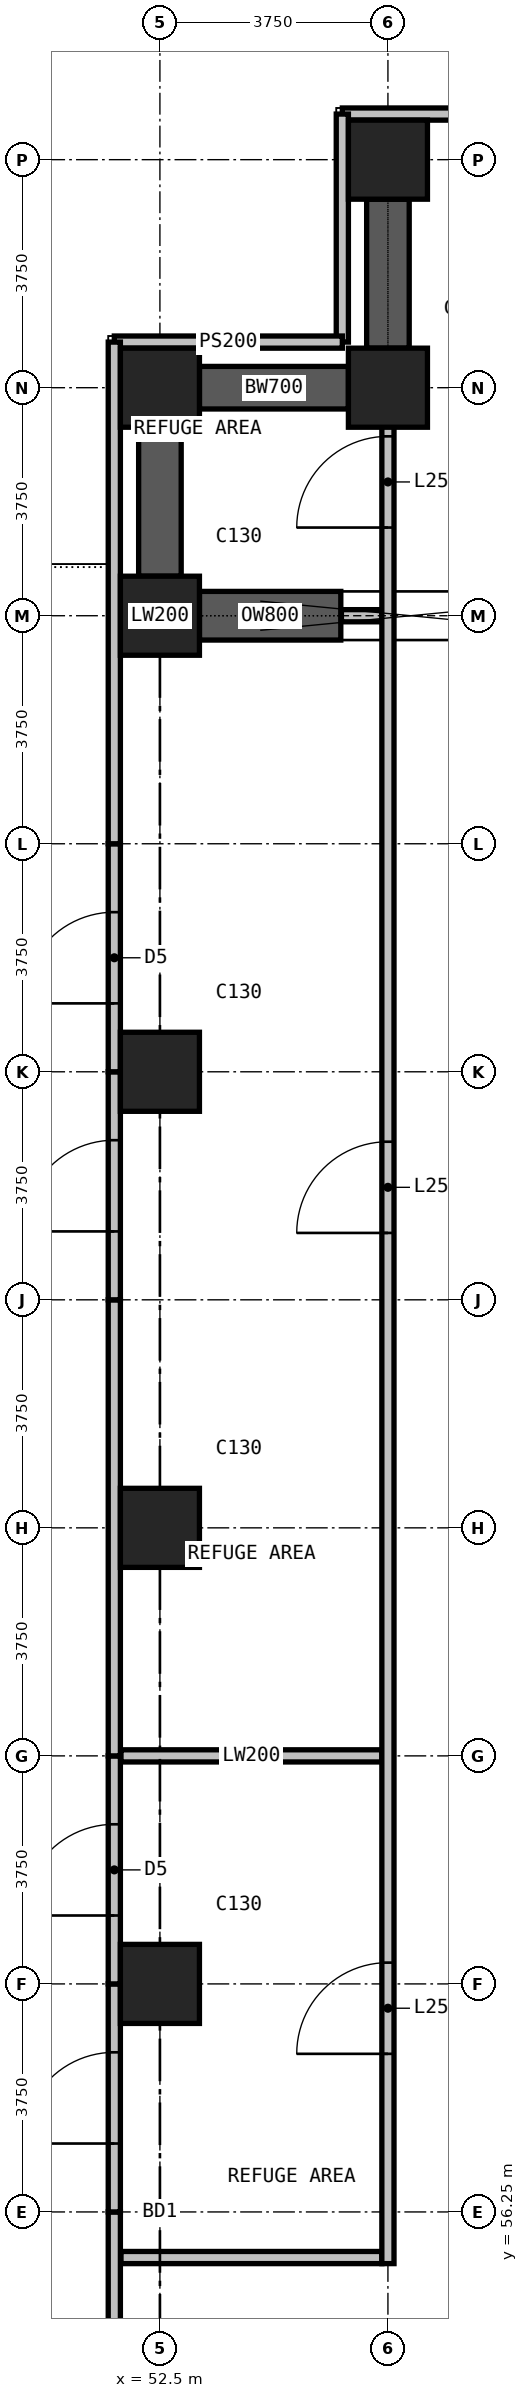
"""IFC4 building model, lengths in metres.
Left out: names, types, materials, properties, quantities, classifications, styles, units other than length and angle.
Written with IfcOpenShell. Run it as: python <this file> out.ifc"""

import sys

from ifc_helpers import new_model, si_unit, direction, frame, frame_2d, origin, origin_2d, place, context, subcontext, project, spatial, rectangle, extrude, element, fill, save


model = new_model("IFC4")
c1 = context("Model", 3, precision=1e-05, world=origin(), true_north=direction((0.0, 1.0)))
c2 = subcontext(c1, "Body", "Model", "MODEL_VIEW")
j1 = project(units=[si_unit("LENGTHUNIT", "METRE"), si_unit("PLANEANGLEUNIT", "RADIAN")], contexts=[c1])
p1 = place(None, origin())
s1 = spatial("IfcSite", under=j1, at=p1, CompositionType="ELEMENT")
p2 = place(p1, origin())
s2 = spatial("IfcBuilding", under=s1, at=p2, CompositionType="ELEMENT")
p3 = place(p2, frame((0.0, 0.0, 102.2)))
s3 = spatial("IfcBuildingStorey", under=s2, at=p3, CompositionType="ELEMENT", Elevation=102.2)
for number, where, z_axis, x_axis in (
    (1, (52.5, 60.0, 0.0), (0.0, 0.0, 1.0), (1.0, 0.0, 0.0)),
    (2, (52.5, 67.5, 0.0), (0.0, 0.0, 1.0), (1.0, 0.0, 0.0)),
    (3, (52.5, 75.0, 0.0), (0.0, 0.0, 1.0), (1.0, 0.0, 0.0)),
    (4, (52.5, 82.5, 0.0), (0.0, 0.0, 1.0), (1.0, 0.0, 0.0)),
    (5, (52.5, 86.25, 0.0), (0.0, 0.0, 1.0), (1.0, 0.0, 0.0)),
    (6, (56.25, 86.25, 0.0), (0.0, 0.0, 1.0), (1.0, 0.0, 0.0)),
    (7, (56.25, 90.0, 0.0), (0.0, 0.0, 1.0), (1.0, 0.0, 0.0)),
):
    element("IfcColumn", number, at=place(p3, frame(where, z_axis=z_axis, x_axis=x_axis)), inside=s3, PredefinedType="COLUMN", context=c2, shape_type="SweptSolid", body=[
        extrude(rectangle(XDim=1.3, YDim=1.3, at=origin_2d()), origin(), (0.0, 0.0, 1.0), 5.0),
    ])
for number, where, z_axis, x_axis in (
    (8, (52.5, 83.15, 0.0), (0.0, 0.0, 1.0), (0.0, 1.0, 0.0)),
    (9, (53.15, 86.25, 0.0), (0.0, 0.0, 1.0), (1.0, 0.0, 0.0)),
    (10, (56.25, 86.9, 0.0), (0.0, 0.0, 1.0), (0.0, 1.0, 0.0)),
):
    element("IfcWall", number, at=place(p3, frame(where, z_axis=z_axis, x_axis=x_axis)), inside=s3, PredefinedType="SHEAR", context=c2, shape_type="SweptSolid", body=[
        extrude(rectangle(XDim=2.45, YDim=0.7, at=frame_2d((1.225, 0.0))), origin(), (0.0, 0.0, 1.0), 4.7),
    ])
p4 = place(p3, frame((53.15, 82.5, 0.0), z_axis=(0.0, 0.0, 1.0), x_axis=(1.0, 0.0, 0.0)))
e11 = element("IfcWall", 11, at=p4, inside=s3, PredefinedType="SHEAR", context=c2, shape_type="SweptSolid", body=[
    extrude(rectangle(XDim=2.325, YDim=0.8, at=frame_2d((1.163, 0.0))), origin(), (0.0, 0.0, 1.0), 4.7),
])
for number, where, z_axis, x_axis in (
    (12, (55.5, 90.75, 0.0), (0.0, 0.0, 1.0), (1.0, 0.0, 0.0)),
    (13, (55.5, 87.0, 0.0), (0.0, 0.0, 1.0), (0.0, 1.0, 0.0)),
    (14, (51.75, 87.0, 0.0), (0.0, 0.0, 1.0), (1.0, 0.0, 0.0)),
):
    element("IfcWall", number, at=place(p3, frame(where, z_axis=z_axis, x_axis=x_axis)), inside=s3, PredefinedType="SOLIDWALL", context=c2, shape_type="SweptSolid", body=[
        extrude(rectangle(XDim=3.75, YDim=0.2, at=frame_2d((1.875, 0.0))), origin(), (0.0, 0.0, 1.0), 4.7),
    ])
p5 = place(p3, frame((51.75, 51.75, 0.0), z_axis=(0.0, 0.0, 1.0), x_axis=(0.0, 1.0, 0.0)))
e15 = element("IfcWall", 15, at=p5, inside=s3, PredefinedType="SOLIDWALL", context=c2, shape_type="SweptSolid", body=[
    extrude(rectangle(XDim=4.5, YDim=0.2, at=frame_2d((2.25, 0.0))), origin(), (0.0, 0.0, 1.0), 4.7),
])
p6 = place(p3, frame((51.75, 56.25, 0.0), z_axis=(0.0, 0.0, 1.0), x_axis=(0.0, 1.0, 0.0)))
e16 = element("IfcWall", 16, at=p6, inside=s3, PredefinedType="SOLIDWALL", context=c2, shape_type="SweptSolid", body=[
    extrude(rectangle(XDim=3.75, YDim=0.2, at=frame_2d((1.875, 0.0))), origin(), (0.0, 0.0, 1.0), 4.7),
])
p7 = place(p6, frame((1.125, 0.0, 0.0)))
e17 = element("IfcOpeningElement", 17, at=p7, cuts=e16, PredefinedType="OPENING", context=c2, shape_type="SweptSolid", body=[
    extrude(rectangle(XDim=1.5, YDim=2.4, at=frame_2d((0.75, 1.2))), frame((0.0, 0.11, 0.0), z_axis=(0.0, -1.0, 0.0), x_axis=(1.0, 0.0, 0.0)), (0.0, 0.0, 1.0), 0.22),
])
p8 = place(p3, frame((51.75, 60.0, 0.0), z_axis=(0.0, 0.0, 1.0), x_axis=(0.0, 1.0, 0.0)))
e18 = element("IfcWall", 18, at=p8, inside=s3, PredefinedType="SOLIDWALL", context=c2, shape_type="SweptSolid", body=[
    extrude(rectangle(XDim=3.75, YDim=0.2, at=frame_2d((1.875, 0.0))), origin(), (0.0, 0.0, 1.0), 4.7),
])
p9 = place(p8, frame((1.125, 0.0, 0.0)))
e19 = element("IfcOpeningElement", 19, at=p9, cuts=e18, PredefinedType="OPENING", context=c2, shape_type="SweptSolid", body=[
    extrude(rectangle(XDim=1.5, YDim=2.4, at=frame_2d((0.75, 1.2))), frame((0.0, 0.11, 0.0), z_axis=(0.0, -1.0, 0.0), x_axis=(1.0, 0.0, 0.0)), (0.0, 0.0, 1.0), 0.22),
])
p10 = place(p3, frame((51.75, 63.75, 0.0), z_axis=(0.0, 0.0, 1.0), x_axis=(0.0, 1.0, 0.0)))
e20 = element("IfcWall", 20, at=p10, inside=s3, PredefinedType="SOLIDWALL", context=c2, shape_type="SweptSolid", body=[
    extrude(rectangle(XDim=7.5, YDim=0.2, at=frame_2d((3.75, 0.0))), origin(), (0.0, 0.0, 1.0), 4.7),
])
p11 = place(p3, frame((51.75, 71.25, 0.0), z_axis=(0.0, 0.0, 1.0), x_axis=(0.0, 1.0, 0.0)))
e21 = element("IfcWall", 21, at=p11, inside=s3, PredefinedType="SOLIDWALL", context=c2, shape_type="SweptSolid", body=[
    extrude(rectangle(XDim=3.75, YDim=0.2, at=frame_2d((1.875, 0.0))), origin(), (0.0, 0.0, 1.0), 4.7),
])
p12 = place(p11, frame((1.125, 0.0, 0.0)))
e22 = element("IfcOpeningElement", 22, at=p12, cuts=e21, PredefinedType="OPENING", context=c2, shape_type="SweptSolid", body=[
    extrude(rectangle(XDim=1.5, YDim=2.4, at=frame_2d((0.75, 1.2))), frame((0.0, 0.11, 0.0), z_axis=(0.0, -1.0, 0.0), x_axis=(1.0, 0.0, 0.0)), (0.0, 0.0, 1.0), 0.22),
])
p13 = place(p3, frame((51.75, 75.0, 0.0), z_axis=(0.0, 0.0, 1.0), x_axis=(0.0, 1.0, 0.0)))
e23 = element("IfcWall", 23, at=p13, inside=s3, PredefinedType="SOLIDWALL", context=c2, shape_type="SweptSolid", body=[
    extrude(rectangle(XDim=3.75, YDim=0.2, at=frame_2d((1.875, 0.0))), origin(), (0.0, 0.0, 1.0), 4.7),
])
p14 = place(p13, frame((1.125, 0.0, 0.0)))
e24 = element("IfcOpeningElement", 24, at=p14, cuts=e23, PredefinedType="OPENING", context=c2, shape_type="SweptSolid", body=[
    extrude(rectangle(XDim=1.5, YDim=2.4, at=frame_2d((0.75, 1.2))), frame((0.0, 0.11, 0.0), z_axis=(0.0, -1.0, 0.0), x_axis=(1.0, 0.0, 0.0)), (0.0, 0.0, 1.0), 0.22),
])
p15 = place(p3, frame((51.75, 78.75, 0.0), z_axis=(0.0, 0.0, 1.0), x_axis=(0.0, 1.0, 0.0)))
e25 = element("IfcWall", 25, at=p15, inside=s3, PredefinedType="SOLIDWALL", context=c2, shape_type="SweptSolid", body=[
    extrude(rectangle(XDim=8.25, YDim=0.2, at=frame_2d((4.125, 0.0))), origin(), (0.0, 0.0, 1.0), 4.7),
])
for number, where, z_axis, x_axis in (
    (26, (51.86, 55.5, 0.0), (0.0, 0.0, 1.0), (1.0, 0.0, 0.0)),
    (27, (51.86, 63.75, 0.0), (0.0, 0.0, 1.0), (1.0, 0.0, 0.0)),
):
    element("IfcWall", number, at=place(p3, frame(where, z_axis=z_axis, x_axis=x_axis)), inside=s3, PredefinedType="PARTITIONING", context=c2, shape_type="SweptSolid", body=[
        extrude(rectangle(XDim=4.29, YDim=0.2, at=frame_2d((2.145, 0.0))), origin(), (0.0, 0.0, 1.0), 4.7),
    ])
p16 = place(p3, frame((51.86, 82.5, 0.0), z_axis=(0.0, 0.0, 1.0), x_axis=(1.0, 0.0, 0.0)))
e28 = element("IfcWall", 28, at=p16, inside=s3, PredefinedType="PARTITIONING", context=c2, shape_type="SweptSolid", body=[
    extrude(rectangle(XDim=1.28, YDim=0.2, at=frame_2d((0.64, 0.0))), origin(), (0.0, 0.0, 1.0), 4.7),
])
p17 = place(p3, frame((55.485, 82.5, 0.0), z_axis=(0.0, 0.0, 1.0), x_axis=(1.0, 0.0, 0.0)))
e29 = element("IfcWall", 29, at=p17, inside=s3, PredefinedType="PARTITIONING", context=c2, shape_type="SweptSolid", body=[
    extrude(rectangle(XDim=0.665, YDim=0.2, at=frame_2d((0.333, 0.0))), origin(), (0.0, 0.0, 1.0), 2.4),
])
p18 = place(p3, frame((56.25, 55.4, 0.0), z_axis=(0.0, 0.0, 1.0), x_axis=(0.0, 1.0, 0.0)))
e30 = element("IfcWall", 30, at=p18, inside=s3, PredefinedType="PARTITIONING", context=c2, shape_type="SweptSolid", body=[
    extrude(rectangle(XDim=31.49, YDim=0.2, at=frame_2d((15.745, 0.0))), origin(), (0.0, 0.0, 1.0), 4.7),
])
p19 = place(p18, frame((3.45, 0.0, 0.0)))
e31 = element("IfcOpeningElement", 31, at=p19, cuts=e30, PredefinedType="OPENING", context=c2, shape_type="SweptSolid", body=[
    extrude(rectangle(XDim=1.5, YDim=2.2, at=frame_2d((0.75, 1.1))), frame((0.0, 0.11, 0.0), z_axis=(0.0, -1.0, 0.0), x_axis=(1.0, 0.0, 0.0)), (0.0, 0.0, 1.0), 0.22),
])
p20 = place(p18, frame((16.95, 0.0, 0.0)))
e32 = element("IfcOpeningElement", 32, at=p20, cuts=e30, PredefinedType="OPENING", context=c2, shape_type="SweptSolid", body=[
    extrude(rectangle(XDim=1.5, YDim=2.2, at=frame_2d((0.75, 1.1))), frame((0.0, 0.11, 0.0), z_axis=(0.0, -1.0, 0.0), x_axis=(1.0, 0.0, 0.0)), (0.0, 0.0, 1.0), 0.22),
])
p21 = place(p18, frame((28.55, 0.0, 0.0)))
e33 = element("IfcOpeningElement", 33, at=p21, cuts=e30, PredefinedType="OPENING", context=c2, shape_type="SweptSolid", body=[
    extrude(rectangle(XDim=1.5, YDim=2.2, at=frame_2d((0.75, 1.1))), frame((0.0, 0.11, 0.0), z_axis=(0.0, -1.0, 0.0), x_axis=(1.0, 0.0, 0.0)), (0.0, 0.0, 1.0), 0.22),
])
p22 = place(p3, frame((56.25, 89.36, 0.0), z_axis=(0.0, 0.0, 1.0), x_axis=(0.0, 1.0, 0.0)))
e34 = element("IfcWall", 34, at=p22, inside=s3, PredefinedType="PARTITIONING", context=c2, shape_type="SweptSolid", body=[
    extrude(rectangle(XDim=1.28, YDim=0.2, at=frame_2d((0.64, 0.0))), origin(), (0.0, 0.0, 1.0), 4.7),
])
p23 = place(p7, origin())
e35 = element("IfcDoor", 35, at=p23, inside=s3, OperationType="DOUBLE_DOOR_SINGLE_SWING", PredefinedType="DOOR", context=c2, shape_type="SweptSolid", body=[
    extrude(rectangle(XDim=1.5, YDim=2.4, at=frame_2d((0.75, 1.2))), frame((0.0, 0.025, 0.0), z_axis=(0.0, -1.0, 0.0), x_axis=(1.0, 0.0, 0.0)), (0.0, 0.0, 1.0), 0.05),
])
fill(e17, e35)
p24 = place(p9, origin())
e36 = element("IfcDoor", 36, at=p24, inside=s3, OperationType="DOUBLE_DOOR_SINGLE_SWING", PredefinedType="DOOR", context=c2, shape_type="SweptSolid", body=[
    extrude(rectangle(XDim=1.5, YDim=2.4, at=frame_2d((0.75, 1.2))), frame((0.0, 0.025, 0.0), z_axis=(0.0, -1.0, 0.0), x_axis=(1.0, 0.0, 0.0)), (0.0, 0.0, 1.0), 0.05),
])
fill(e19, e36)
p25 = place(p12, origin())
e37 = element("IfcDoor", 37, at=p25, inside=s3, OperationType="DOUBLE_DOOR_SINGLE_SWING", PredefinedType="DOOR", context=c2, shape_type="SweptSolid", body=[
    extrude(rectangle(XDim=1.5, YDim=2.4, at=frame_2d((0.75, 1.2))), frame((0.0, 0.025, 0.0), z_axis=(0.0, -1.0, 0.0), x_axis=(1.0, 0.0, 0.0)), (0.0, 0.0, 1.0), 0.05),
])
fill(e22, e37)
p26 = place(p14, origin())
e38 = element("IfcDoor", 38, at=p26, inside=s3, OperationType="DOUBLE_DOOR_SINGLE_SWING", PredefinedType="DOOR", context=c2, shape_type="SweptSolid", body=[
    extrude(rectangle(XDim=1.5, YDim=2.4, at=frame_2d((0.75, 1.2))), frame((0.0, 0.025, 0.0), z_axis=(0.0, -1.0, 0.0), x_axis=(1.0, 0.0, 0.0)), (0.0, 0.0, 1.0), 0.05),
])
fill(e24, e38)
p27 = place(p19, origin())
e39 = element("IfcDoor", 39, at=p27, inside=s3, OperationType="DOUBLE_DOOR_SINGLE_SWING", PredefinedType="DOOR", context=c2, shape_type="SweptSolid", body=[
    extrude(rectangle(XDim=1.5, YDim=2.2, at=frame_2d((0.75, 1.1))), frame((0.0, 0.025, 0.0), z_axis=(0.0, -1.0, 0.0), x_axis=(1.0, 0.0, 0.0)), (0.0, 0.0, 1.0), 0.05),
])
fill(e31, e39)
p28 = place(p20, origin())
e40 = element("IfcDoor", 40, at=p28, inside=s3, OperationType="DOUBLE_DOOR_SINGLE_SWING", PredefinedType="DOOR", context=c2, shape_type="SweptSolid", body=[
    extrude(rectangle(XDim=1.5, YDim=2.2, at=frame_2d((0.75, 1.1))), frame((0.0, 0.025, 0.0), z_axis=(0.0, -1.0, 0.0), x_axis=(1.0, 0.0, 0.0)), (0.0, 0.0, 1.0), 0.05),
])
fill(e32, e40)
p29 = place(p21, origin())
e41 = element("IfcDoor", 41, at=p29, inside=s3, OperationType="DOUBLE_DOOR_SINGLE_SWING", PredefinedType="DOOR", context=c2, shape_type="SweptSolid", body=[
    extrude(rectangle(XDim=1.5, YDim=2.2, at=frame_2d((0.75, 1.1))), frame((0.0, 0.025, 0.0), z_axis=(0.0, -1.0, 0.0), x_axis=(1.0, 0.0, 0.0)), (0.0, 0.0, 1.0), 0.05),
])
fill(e33, e41)
save(model, sys.argv[1])
